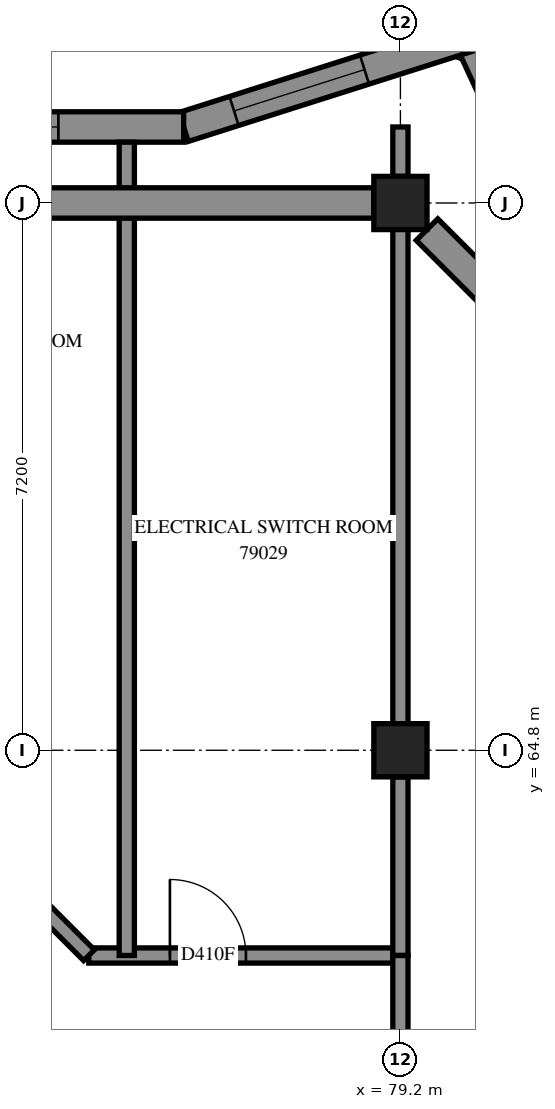
"""IFC4 building model, lengths in metres.
Left out: names, types, materials, properties, quantities, classifications, styles, units other than length and angle.
Written with IfcOpenShell. Run it as: python <this file> out.ifc"""

import sys

from ifc_helpers import new_model, si_unit, direction, frame, frame_2d, origin, origin_2d, place, context, subcontext, project, spatial, polyline, rectangle, outline, extrude, element, fill, save


model = new_model("IFC4")
c1 = context("Model", 3, precision=1e-05, world=origin(), true_north=direction((0.0, 1.0)))
c2 = subcontext(c1, "Body", "Model", "MODEL_VIEW")
j1 = project(units=[si_unit("LENGTHUNIT", "METRE"), si_unit("PLANEANGLEUNIT", "RADIAN")], contexts=[c1])
p1 = place(None, origin())
s1 = spatial("IfcSite", under=j1, at=p1, CompositionType="ELEMENT")
p2 = place(p1, origin())
s2 = spatial("IfcBuilding", under=s1, at=p2, CompositionType="ELEMENT")
p3 = place(p2, frame((0.0, 0.0, 290.6)))
s3 = spatial("IfcBuildingStorey", under=s2, at=p3, CompositionType="ELEMENT", Elevation=290.6)
for number, where, z_axis, x_axis in (
    (1, (79.2, 64.8, 0.0), (0.0, 0.0, 1.0), (1.0, 0.0, 0.0)),
    (2, (79.2, 72.0, 0.0), (0.0, 0.0, 1.0), (1.0, 0.0, 0.0)),
):
    element("IfcColumn", number, at=place(p3, frame(where, z_axis=z_axis, x_axis=x_axis)), inside=s3, PredefinedType="COLUMN", context=c2, shape_type="SweptSolid", body=[
        extrude(rectangle(XDim=0.7, YDim=0.7, at=origin_2d()), origin(), (0.0, 0.0, 1.0), 3.5),
    ])
p4 = place(p3, frame((81.53, 71.085, 0.0), z_axis=(0.0, 0.0, 1.0), x_axis=(-0.4192640124, 0.9078643555, 0.0)))
e3 = element("IfcWall", 3, at=p4, inside=s3, PredefinedType="SOLIDWALL", context=c2, shape_type="SweptSolid", body=[
    extrude(outline(polyline([(0.036, -0.2), (3.596, -0.2), (3.243, 0.2), (-0.036, 0.2), (0.036, -0.2)])), origin(), (0.0, 0.0, 1.0), 3.5),
])
p5 = place(p4, frame((0.423, 0.0, 0.7)))
e4 = element("IfcOpeningElement", 4, at=p5, cuts=e3, PredefinedType="OPENING", context=c2, shape_type="SweptSolid", body=[
    extrude(rectangle(XDim=1.8, YDim=2.2, at=frame_2d((0.9, 1.1))), frame((0.0, 0.21, 0.0), z_axis=(0.0, -1.0, 0.0), x_axis=(1.0, 0.0, 0.0)), (0.0, 0.0, 1.0), 0.42),
])
p6 = place(p3, frame((80.096, 74.189, 0.0), z_axis=(0.0, 0.0, 1.0), x_axis=(-0.9531812986, -0.3023994247, 0.0)))
e5 = element("IfcWall", 5, at=p6, inside=s3, PredefinedType="SOLIDWALL", context=c2, shape_type="SweptSolid", body=[
    extrude(outline(polyline([(-0.176, -0.2), (3.901, -0.2), (3.963, 0.2), (0.176, 0.2), (-0.176, -0.2)])), origin(), (0.0, 0.0, 1.0), 3.5),
])
p7 = place(p6, frame((1.436, 0.0, 0.7)))
e6 = element("IfcOpeningElement", 6, at=p7, cuts=e5, PredefinedType="OPENING", context=c2, shape_type="SweptSolid", body=[
    extrude(rectangle(XDim=1.8, YDim=2.2, at=frame_2d((0.9, 1.1))), frame((0.0, 0.21, 0.0), z_axis=(0.0, -1.0, 0.0), x_axis=(1.0, 0.0, 0.0)), (0.0, 0.0, 1.0), 0.42),
])
p8 = place(p3, frame((76.348, 73.0, 0.0), z_axis=(0.0, 0.0, 1.0), x_axis=(-1.0, 0.0, 0.0)))
e7 = element("IfcWall", 7, at=p8, inside=s3, PredefinedType="SOLIDWALL", context=c2, shape_type="SweptSolid", body=[
    extrude(outline(polyline([(0.031, -0.2), (7.804, -0.2), (7.804, 0.2), (-0.031, 0.2), (0.031, -0.2)])), origin(), (0.0, 0.0, 1.0), 3.5),
])
p9 = place(p8, frame((1.648, 0.0, 0.7)))
e8 = element("IfcOpeningElement", 8, at=p9, cuts=e7, PredefinedType="OPENING", context=c2, shape_type="SweptSolid", body=[
    extrude(rectangle(XDim=1.8, YDim=2.2, at=frame_2d((0.9, 1.1))), frame((0.0, 0.21, 0.0), z_axis=(0.0, -1.0, 0.0), x_axis=(1.0, 0.0, 0.0)), (0.0, 0.0, 1.0), 0.42),
])
p10 = place(p8, frame((5.076, 0.0, 0.7)))
e9 = element("IfcOpeningElement", 9, at=p10, cuts=e7, PredefinedType="OPENING", context=c2, shape_type="SweptSolid", body=[
    extrude(rectangle(XDim=1.8, YDim=2.2, at=frame_2d((0.9, 1.1))), frame((0.0, 0.21, 0.0), z_axis=(0.0, -1.0, 0.0), x_axis=(1.0, 0.0, 0.0)), (0.0, 0.0, 1.0), 0.42),
])
p11 = place(p3, frame((79.2, 64.45, 0.0), z_axis=(0.0, 0.0, 1.0), x_axis=(0.0, 1.0, 0.0)))
e10 = element("IfcWall", 10, at=p11, inside=s3, PredefinedType="PARTITIONING", context=c2, shape_type="SweptSolid", body=[
    extrude(rectangle(XDim=7.9, YDim=0.2, at=frame_2d((3.95, 0.0))), origin(), (0.0, 0.0, 1.0), 3.5),
])
p12 = place(p3, frame((75.1, 62.1, 0.0), z_axis=(0.0, 0.0, 1.0), x_axis=(1.0, 0.0, 0.0)))
e11 = element("IfcWall", 11, at=p12, inside=s3, PredefinedType="PARTITIONING", context=c2, shape_type="SweptSolid", body=[
    extrude(rectangle(XDim=4.1, YDim=0.2, at=frame_2d((2.05, 0.0))), origin(), (0.0, 0.0, 1.0), 3.5),
])
p13 = place(p12, frame((1.067, 0.0, 0.0)))
e12 = element("IfcOpeningElement", 12, at=p13, cuts=e11, PredefinedType="OPENING", context=c2, shape_type="SweptSolid", body=[
    extrude(rectangle(XDim=1.0, YDim=2.1, at=frame_2d((0.5, 1.05))), frame((0.0, 0.11, 0.0), z_axis=(0.0, -1.0, 0.0), x_axis=(1.0, 0.0, 0.0)), (0.0, 0.0, 1.0), 0.22),
])
p14 = place(p3, frame((79.2, 62.1, 0.0), z_axis=(0.0, 0.0, 1.0), x_axis=(0.0, 1.0, 0.0)))
e13 = element("IfcWall", 13, at=p14, inside=s3, PredefinedType="PARTITIONING", context=c2, shape_type="SweptSolid", body=[
    extrude(rectangle(XDim=2.35, YDim=0.2, at=frame_2d((1.175, 0.0))), origin(), (0.0, 0.0, 1.0), 3.5),
])
p15 = place(p3, frame((79.2, 60.3, 0.0), z_axis=(0.0, 0.0, 1.0), x_axis=(0.0, 1.0, 0.0)))
e14 = element("IfcWall", 14, at=p15, inside=s3, PredefinedType="PARTITIONING", context=c2, shape_type="SweptSolid", body=[
    extrude(rectangle(XDim=1.8, YDim=0.2, at=frame_2d((0.9, 0.0))), origin(), (0.0, 0.0, 1.0), 3.5),
])
p16 = place(p3, frame((74.403, 62.803, 0.0), z_axis=(0.0, 0.0, 1.0), x_axis=(0.7071067812, -0.7071067812, 0.0)))
e15 = element("IfcWall", 15, at=p16, inside=s3, PredefinedType="PARTITIONING", context=c2, shape_type="SweptSolid", body=[
    extrude(rectangle(XDim=0.99, YDim=0.2, at=frame_2d((0.495, 0.0))), origin(), (0.0, 0.0, 1.0), 3.5),
])
p17 = place(p3, frame((79.2, 72.35, 0.0), z_axis=(0.0, 0.0, 1.0), x_axis=(0.0, 1.0, 0.0)))
e16 = element("IfcWall", 16, at=p17, inside=s3, PredefinedType="PARTITIONING", context=c2, shape_type="SweptSolid", body=[
    extrude(rectangle(XDim=0.65, YDim=0.2, at=frame_2d((0.325, 0.0))), origin(), (0.0, 0.0, 1.0), 3.5),
])
p18 = place(p3, frame((75.6, 62.1, 0.0), z_axis=(0.0, 0.0, 1.0), x_axis=(0.0, 1.0, 0.0)))
e17 = element("IfcWall", 17, at=p18, inside=s3, PredefinedType="PARTITIONING", context=c2, shape_type="SweptSolid", body=[
    extrude(outline(polyline([(0.0, -0.1), (10.7, -0.1), (10.7, 0.1), (0.0, 0.1), (0.0, -0.1)])), origin(), (0.0, 0.0, 1.0), 3.5),
])
p19 = place(p7, origin())
e18 = element("IfcWindow", 18, at=p19, inside=s3, PartitioningType="SINGLE_PANEL", PredefinedType="WINDOW", context=c2, shape_type="SweptSolid", body=[
    extrude(rectangle(XDim=1.8, YDim=2.2, at=frame_2d((0.9, 1.1))), frame((0.0, 0.08, 0.0), z_axis=(0.0, -1.0, 0.0), x_axis=(1.0, 0.0, 0.0)), (0.0, 0.0, 1.0), 0.06),
])
fill(e6, e18)
p20 = place(p9, origin())
e19 = element("IfcWindow", 19, at=p20, inside=s3, PartitioningType="SINGLE_PANEL", PredefinedType="WINDOW", context=c2, shape_type="SweptSolid", body=[
    extrude(rectangle(XDim=1.8, YDim=2.2, at=frame_2d((0.9, 1.1))), frame((0.0, 0.08, 0.0), z_axis=(0.0, -1.0, 0.0), x_axis=(1.0, 0.0, 0.0)), (0.0, 0.0, 1.0), 0.06),
])
fill(e8, e19)
p21 = place(p13, origin())
e20 = element("IfcDoor", 20, at=p21, inside=s3, OperationType="SINGLE_SWING_LEFT", PredefinedType="DOOR", context=c2, shape_type="SweptSolid", body=[
    extrude(rectangle(XDim=1.0, YDim=2.1, at=frame_2d((0.5, 1.05))), frame((0.0, 0.025, 0.0), z_axis=(0.0, -1.0, 0.0), x_axis=(1.0, 0.0, 0.0)), (0.0, 0.0, 1.0), 0.05),
])
fill(e12, e20)
save(model, sys.argv[1])
